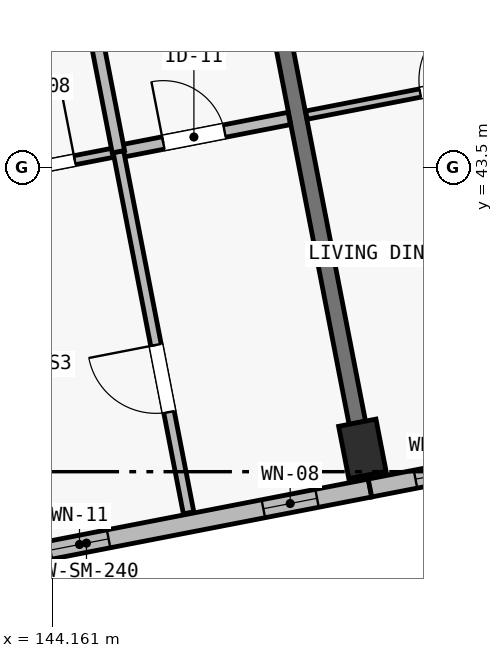
"""IFC4 building model, lengths in metres.
Left out: names, types, materials, properties, quantities, classifications, styles, units other than length and angle.
Written with IfcOpenShell. Run it as: python <this file> out.ifc"""

import sys

from ifc_helpers import new_model, si_unit, direction, frame, frame_2d, origin, origin_2d, place, context, subcontext, project, spatial, rectangle, extrude, element, fill, save


model = new_model("IFC4")
c1 = context("Model", 3, precision=1e-05, world=origin(), true_north=direction((0.0, 1.0)))
c2 = subcontext(c1, "Body", "Model", "MODEL_VIEW")
j1 = project(units=[si_unit("LENGTHUNIT", "METRE"), si_unit("PLANEANGLEUNIT", "RADIAN")], contexts=[c1])
p1 = place(None, origin())
s1 = spatial("IfcSite", under=j1, at=p1, CompositionType="ELEMENT")
p2 = place(p1, origin())
s2 = spatial("IfcBuilding", under=s1, at=p2, CompositionType="ELEMENT")
p3 = place(p2, frame((0.0, 0.0, 8.4)))
s3 = spatial("IfcBuildingStorey", under=s2, at=p3, CompositionType="ELEMENT", Elevation=8.4)
p4 = place(p3, frame((148.241, 39.801, 0.0), z_axis=(0.0, 0.0, 1.0), x_axis=(0.981627183448, 0.190808995377, 0.0)))
e1 = element("IfcColumn", 1, at=p4, inside=s3, PredefinedType="COLUMN", context=c2, shape_type="SweptSolid", body=[
    extrude(rectangle(XDim=0.5, YDim=0.7, at=origin_2d()), origin(), (0.0, 0.0, 1.0), 3.25),
])
p5 = place(p3, frame((148.175, 40.144, 0.0), z_axis=(0.0, 0.0, 1.0), x_axis=(-0.190812837813, 0.981626436546, 0.0)))
e2 = element("IfcWall", 2, at=p5, inside=s3, PredefinedType="SHEAR", context=c2, shape_type="SweptSolid", body=[
    extrude(rectangle(XDim=6.9, YDim=0.22, at=frame_2d((3.45, 0.0))), origin(), (0.0, 0.0, 1.0), 2.5),
])
p6 = place(p3, frame((148.342, 39.285, 0.0), z_axis=(0.0, 0.0, 1.0), x_axis=(-0.981631269434, -0.190787973596, 0.0)))
e3 = element("IfcWall", 3, at=p6, inside=s3, PredefinedType="SOLIDWALL", context=c2, shape_type="SweptSolid", body=[
    extrude(rectangle(XDim=7.6, YDim=0.24, at=frame_2d((3.8, 0.0))), origin(), (0.0, 0.0, 1.0), 3.0),
])
p7 = place(p6, frame((0.71, 0.0, 0.52)))
e4 = element("IfcOpeningElement", 4, at=p7, cuts=e3, PredefinedType="OPENING", context=c2, shape_type="SweptSolid", body=[
    extrude(rectangle(XDim=0.72, YDim=2.16, at=frame_2d((0.36, 1.08))), frame((0.0, 0.135, 0.0), z_axis=(0.0, -1.0, 0.0), x_axis=(1.0, 0.0, 0.0)), (0.0, 0.0, 1.0), 0.27),
])
p8 = place(p6, frame((3.504, 0.0, 0.52)))
e5 = element("IfcOpeningElement", 5, at=p8, cuts=e3, PredefinedType="OPENING", context=c2, shape_type="SweptSolid", body=[
    extrude(rectangle(XDim=0.78, YDim=2.2, at=frame_2d((0.39, 1.1))), frame((0.0, 0.135, 0.0), z_axis=(0.0, -1.0, 0.0), x_axis=(1.0, 0.0, 0.0)), (0.0, 0.0, 1.0), 0.27),
])
p9 = place(p3, frame((155.802, 40.735, 0.0), z_axis=(0.0, 0.0, 1.0), x_axis=(-0.981626422232, -0.190812911449, 0.0)))
e6 = element("IfcWall", 6, at=p9, inside=s3, PredefinedType="SOLIDWALL", context=c2, shape_type="SweptSolid", body=[
    extrude(rectangle(XDim=7.6, YDim=0.24, at=frame_2d((3.8, 0.0))), origin(), (0.0, 0.0, 1.0), 3.0),
])
p10 = place(p9, frame((1.531, 0.0, 0.42)))
e7 = element("IfcOpeningElement", 7, at=p10, cuts=e6, PredefinedType="OPENING", context=c2, shape_type="SweptSolid", body=[
    extrude(rectangle(XDim=0.82, YDim=2.18, at=frame_2d((0.41, 1.09))), frame((0.0, 0.135, 0.0), z_axis=(0.0, -1.0, 0.0), x_axis=(1.0, 0.0, 0.0)), (0.0, 0.0, 1.0), 0.27),
])
p11 = place(p9, frame((4.848, 0.0, 0.42)))
e8 = element("IfcOpeningElement", 8, at=p11, cuts=e6, PredefinedType="OPENING", context=c2, shape_type="SweptSolid", body=[
    extrude(rectangle(XDim=0.58, YDim=2.16, at=frame_2d((0.29, 1.08))), frame((0.0, 0.135, 0.0), z_axis=(0.0, -1.0, 0.0), x_axis=(1.0, 0.0, 0.0)), (0.0, 0.0, 1.0), 0.27),
])
p12 = place(p9, frame((6.39, 0.0, 0.48)))
e9 = element("IfcOpeningElement", 9, at=p12, cuts=e6, PredefinedType="OPENING", context=c2, shape_type="SweptSolid", body=[
    extrude(rectangle(XDim=0.6, YDim=2.22, at=frame_2d((0.3, 1.11))), frame((0.0, 0.135, 0.0), z_axis=(0.0, -1.0, 0.0), x_axis=(1.0, 0.0, 0.0)), (0.0, 0.0, 1.0), 0.27),
])
p13 = place(p3, frame((140.045, 42.741, 0.0), z_axis=(0.0, 0.0, 1.0), x_axis=(0.981629144122, 0.190798908307, 0.0)))
e10 = element("IfcWall", 10, at=p13, inside=s3, PredefinedType="PARTITIONING", context=c2, shape_type="SweptSolid", body=[
    extrude(rectangle(XDim=5.08, YDim=0.12, at=frame_2d((2.54, 0.0))), origin(), (0.0, 0.0, 1.0), 2.97),
])
p14 = place(p13, frame((3.595, 0.0, 0.0)))
e11 = element("IfcOpeningElement", 11, at=p14, cuts=e10, PredefinedType="OPENING", context=c2, shape_type="SweptSolid", body=[
    extrude(rectangle(XDim=0.9, YDim=2.1, at=frame_2d((0.45, 1.05))), frame((0.0, 0.075, 0.0), z_axis=(0.0, -1.0, 0.0), x_axis=(1.0, 0.0, 0.0)), (0.0, 0.0, 1.0), 0.15),
])
p15 = place(p3, frame((145.031, 43.71, 0.0), z_axis=(0.0, 0.0, 1.0), x_axis=(0.981624265801, 0.190824004755, 0.0)))
e12 = element("IfcWall", 12, at=p15, inside=s3, PredefinedType="PLUMBINGWALL", context=c2, shape_type="SweptSolid", body=[
    extrude(rectangle(XDim=2.29, YDim=0.165, at=frame_2d((1.145, 0.0))), origin(), (0.0, 0.0, 1.0), 2.97),
])
p16 = place(p15, frame((0.602, 0.0, 0.0)))
e13 = element("IfcOpeningElement", 13, at=p16, cuts=e12, PredefinedType="OPENING", context=c2, shape_type="SweptSolid", body=[
    extrude(rectangle(XDim=0.82, YDim=2.08, at=frame_2d((0.41, 1.04))), frame((0.0, 0.097, 0.0), z_axis=(0.0, -1.0, 0.0), x_axis=(1.0, 0.0, 0.0)), (0.0, 0.0, 1.0), 0.195),
])
p17 = place(p3, frame((145.955, 38.959, 0.0), z_axis=(0.0, 0.0, 1.0), x_axis=(-0.190826454074, 0.98162378966, 0.0)))
e14 = element("IfcWall", 14, at=p17, inside=s3, PredefinedType="PARTITIONING", context=c2, shape_type="SweptSolid", body=[
    extrude(rectangle(XDim=4.84, YDim=0.14, at=frame_2d((2.42, 0.0))), origin(), (0.0, 0.0, 1.0), 2.97),
])
p18 = place(p17, frame((1.35, 0.0, 0.0)))
e15 = element("IfcOpeningElement", 15, at=p18, cuts=e14, PredefinedType="OPENING", context=c2, shape_type="SweptSolid", body=[
    extrude(rectangle(XDim=0.9, YDim=2.1, at=frame_2d((0.45, 1.05))), frame((0.0, 0.085, 0.0), z_axis=(0.0, -1.0, 0.0), x_axis=(1.0, 0.0, 0.0)), (0.0, 0.0, 1.0), 0.17),
])
p19 = place(p3, frame((145.031, 43.71, 0.0), z_axis=(0.0, 0.0, 1.0), x_axis=(-0.190800102044, 0.981628912095, 0.0)))
e16 = element("IfcWall", 16, at=p19, inside=s3, PredefinedType="PLUMBINGWALL", context=c2, shape_type="SweptSolid", body=[
    extrude(rectangle(XDim=3.57, YDim=0.165, at=frame_2d((1.785, 0.0))), origin(), (0.0, 0.0, 1.0), 2.97),
])
p20 = place(p3, frame((147.505, 44.191, 0.0), z_axis=(0.0, 0.0, 1.0), x_axis=(0.981626422232, 0.190812911449, 0.0)))
e17 = element("IfcWall", 17, at=p20, inside=s3, PredefinedType="PARTITIONING", context=c2, shape_type="SweptSolid", body=[
    extrude(rectangle(XDim=3.685, YDim=0.11, at=frame_2d((1.842, 0.0))), origin(), (0.0, 0.0, 1.0), 2.97),
])
p21 = place(p20, frame((1.525, 0.0, 0.0)))
e18 = element("IfcOpeningElement", 18, at=p21, cuts=e17, PredefinedType="OPENING", context=c2, shape_type="SweptSolid", body=[
    extrude(rectangle(XDim=0.9, YDim=2.1, at=frame_2d((0.45, 1.05))), frame((0.0, 0.07, 0.0), z_axis=(0.0, -1.0, 0.0), x_axis=(1.0, 0.0, 0.0)), (0.0, 0.0, 1.0), 0.14),
])
p22 = place(p7, origin())
e19 = element("IfcWindow", 19, at=p22, inside=s3, PartitioningType="SINGLE_PANEL", PredefinedType="WINDOW", context=c2, shape_type="SweptSolid", body=[
    extrude(rectangle(XDim=0.72, YDim=2.16, at=frame_2d((0.36, 1.08))), frame((0.0, 0.03, 0.0), z_axis=(0.0, -1.0, 0.0), x_axis=(1.0, 0.0, 0.0)), (0.0, 0.0, 1.0), 0.06),
])
fill(e4, e19)
p23 = place(p8, origin())
e20 = element("IfcWindow", 20, at=p23, inside=s3, PartitioningType="SINGLE_PANEL", PredefinedType="WINDOW", context=c2, shape_type="SweptSolid", body=[
    extrude(rectangle(XDim=0.78, YDim=2.2, at=frame_2d((0.39, 1.1))), frame((0.0, 0.03, 0.0), z_axis=(0.0, -1.0, 0.0), x_axis=(1.0, 0.0, 0.0)), (0.0, 0.0, 1.0), 0.06),
])
fill(e5, e20)
p24 = place(p12, origin())
e21 = element("IfcWindow", 21, at=p24, inside=s3, PartitioningType="SINGLE_PANEL", PredefinedType="WINDOW", context=c2, shape_type="SweptSolid", body=[
    extrude(rectangle(XDim=0.6, YDim=2.22, at=frame_2d((0.3, 1.11))), frame((0.0, 0.03, 0.0), z_axis=(0.0, -1.0, 0.0), x_axis=(1.0, 0.0, 0.0)), (0.0, 0.0, 1.0), 0.06),
])
fill(e9, e21)
p25 = place(p14, origin())
e22 = element("IfcDoor", 22, at=p25, inside=s3, OperationType="SINGLE_SWING_RIGHT", PredefinedType="DOOR", context=c2, shape_type="SweptSolid", body=[
    extrude(rectangle(XDim=0.9, YDim=2.1, at=frame_2d((0.45, 1.05))), frame((0.0, 0.025, 0.0), z_axis=(0.0, -1.0, 0.0), x_axis=(1.0, 0.0, 0.0)), (0.0, 0.0, 1.0), 0.05),
])
fill(e11, e22)
p26 = place(p16, origin())
e23 = element("IfcDoor", 23, at=p26, inside=s3, OperationType="SINGLE_SWING_LEFT", PredefinedType="DOOR", context=c2, shape_type="SweptSolid", body=[
    extrude(rectangle(XDim=0.82, YDim=2.08, at=frame_2d((0.41, 1.04))), frame((0.0, 0.025, 0.0), z_axis=(0.0, -1.0, 0.0), x_axis=(1.0, 0.0, 0.0)), (0.0, 0.0, 1.0), 0.05),
])
fill(e13, e23)
p27 = place(p18, origin())
e24 = element("IfcDoor", 24, at=p27, inside=s3, OperationType="SINGLE_SWING_RIGHT", PredefinedType="DOOR", context=c2, shape_type="SweptSolid", body=[
    extrude(rectangle(XDim=0.9, YDim=2.1, at=frame_2d((0.45, 1.05))), frame((0.0, 0.025, 0.0), z_axis=(0.0, -1.0, 0.0), x_axis=(1.0, 0.0, 0.0)), (0.0, 0.0, 1.0), 0.05),
])
fill(e15, e24)
p28 = place(p21, origin())
e25 = element("IfcDoor", 25, at=p28, inside=s3, OperationType="SINGLE_SWING_RIGHT", PredefinedType="DOOR", context=c2, shape_type="SweptSolid", body=[
    extrude(rectangle(XDim=0.9, YDim=2.1, at=frame_2d((0.45, 1.05))), frame((0.0, 0.025, 0.0), z_axis=(0.0, -1.0, 0.0), x_axis=(1.0, 0.0, 0.0)), (0.0, 0.0, 1.0), 0.05),
])
fill(e18, e25)
save(model, sys.argv[1])
